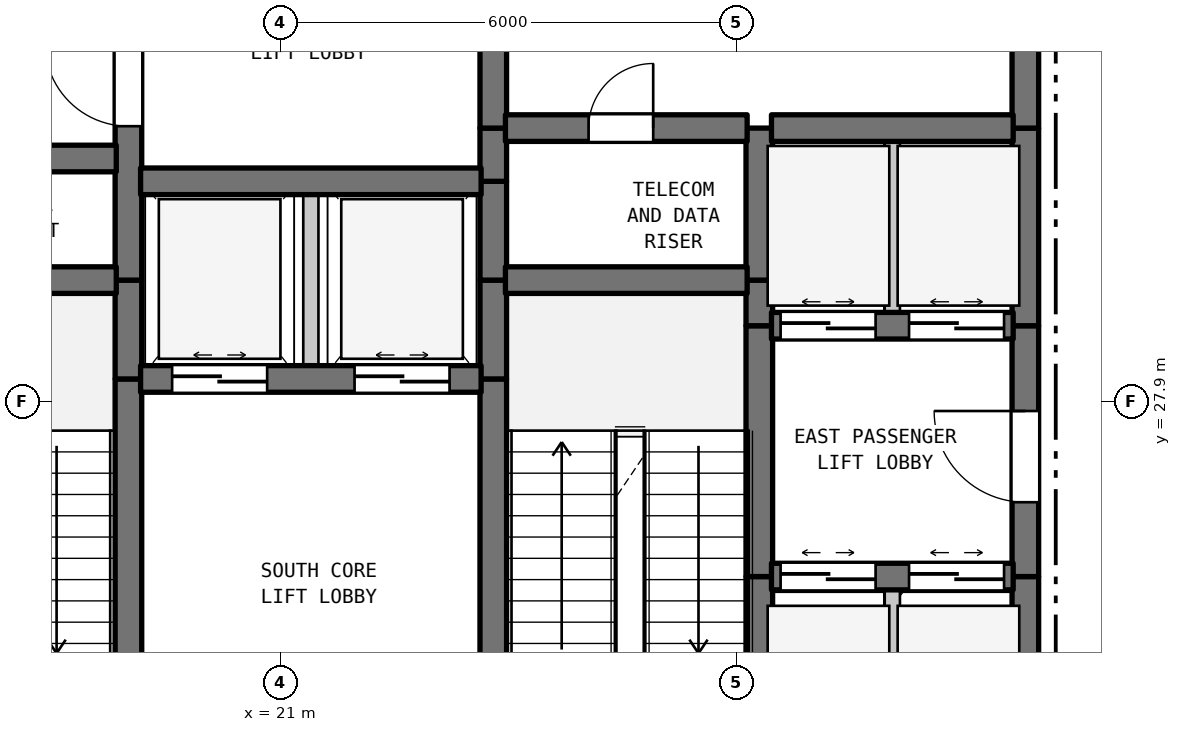
"""IFC4 building model, lengths in metres.
Left out: names, types, materials, properties, quantities, classifications, styles, units other than length and angle.
Written with IfcOpenShell. Run it as: python <this file> out.ifc"""

import sys

from ifc_helpers import new_model, si_unit, direction, frame, frame_2d, origin, place, context, subcontext, project, spatial, rectangle, extrude, element, fill, save


model = new_model("IFC4")
c1 = context("Model", 3, precision=1e-05, world=origin(), true_north=direction((0.0, 1.0)))
c2 = subcontext(c1, "Body", "Model", "MODEL_VIEW")
j1 = project(units=[si_unit("LENGTHUNIT", "METRE"), si_unit("PLANEANGLEUNIT", "RADIAN")], contexts=[c1])
p1 = place(None, origin())
s1 = spatial("IfcSite", under=j1, at=p1, CompositionType="ELEMENT")
p2 = place(p1, origin())
s2 = spatial("IfcBuilding", under=s1, at=p2, CompositionType="ELEMENT")
p3 = place(p2, frame((0.0, 0.0, 125.3)))
s3 = spatial("IfcBuildingStorey", under=s2, at=p3, CompositionType="ELEMENT", Elevation=125.3)
p4 = place(p3, frame((19.0, 22.7, 0.0), z_axis=(0.0, 0.0, 1.0), x_axis=(0.0, 1.0, 0.0)))
e1 = element("IfcWall", 1, at=p4, inside=s3, PredefinedType="SHEAR", context=c2, shape_type="SweptSolid", body=[
    extrude(rectangle(XDim=5.5, YDim=0.35, at=frame_2d((2.75, 0.0))), origin(), (0.0, 0.0, 1.0), 4.185),
])
p5 = place(p4, frame((0.631, 0.0, 0.0)))
e2 = element("IfcOpeningElement", 2, at=p5, cuts=e1, PredefinedType="OPENING", context=c2, shape_type="SweptSolid", body=[
    extrude(rectangle(XDim=1.1, YDim=2.15, at=frame_2d((0.55, 1.075))), frame((0.0, 0.185, 0.0), z_axis=(0.0, -1.0, 0.0), x_axis=(1.0, 0.0, 0.0)), (0.0, 0.0, 1.0), 0.37),
])
p6 = place(p3, frame((19.0, 28.2, 0.0), z_axis=(0.0, 0.0, 1.0), x_axis=(0.0, 1.0, 0.0)))
e3 = element("IfcWall", 3, at=p6, inside=s3, PredefinedType="SHEAR", context=c2, shape_type="SweptSolid", body=[
    extrude(rectangle(XDim=1.3, YDim=0.35, at=frame_2d((0.65, 0.0))), origin(), (0.0, 0.0, 1.0), 4.185),
])
p7 = place(p3, frame((19.0, 29.5, 0.0), z_axis=(0.0, 0.0, 1.0), x_axis=(0.0, 1.0, 0.0)))
e4 = element("IfcWall", 4, at=p7, inside=s3, PredefinedType="SHEAR", context=c2, shape_type="SweptSolid", body=[
    extrude(rectangle(XDim=5.5, YDim=0.35, at=frame_2d((2.75, 0.0))), origin(), (0.0, 0.0, 1.0), 4.185),
])
p8 = place(p7, frame((2.025, 0.0, 0.0)))
e5 = element("IfcOpeningElement", 5, at=p8, cuts=e4, PredefinedType="OPENING", context=c2, shape_type="SweptSolid", body=[
    extrude(rectangle(XDim=1.1, YDim=2.15, at=frame_2d((0.55, 1.075))), frame((0.0, 0.185, 0.0), z_axis=(0.0, -1.0, 0.0), x_axis=(1.0, 0.0, 0.0)), (0.0, 0.0, 1.0), 0.37),
])
p9 = place(p3, frame((21.4, 28.2, 0.0), z_axis=(0.0, 0.0, 1.0), x_axis=(0.0, 1.0, 0.0)))
e6 = element("IfcWall", 6, at=p9, inside=s3, PredefinedType="STANDARD", context=c2, shape_type="SweptSolid", body=[
    extrude(rectangle(XDim=2.6, YDim=0.2, at=frame_2d((1.3, 0.0))), origin(), (0.0, 0.0, 1.0), 4.185),
])
p10 = place(p3, frame((23.8, 22.7, 0.0), z_axis=(0.0, 0.0, 1.0), x_axis=(0.0, 1.0, 0.0)))
e7 = element("IfcWall", 7, at=p10, inside=s3, PredefinedType="SHEAR", context=c2, shape_type="SweptSolid", body=[
    extrude(rectangle(XDim=5.5, YDim=0.35, at=frame_2d((2.75, 0.0))), origin(), (0.0, 0.0, 1.0), 4.185),
])
p11 = place(p10, frame((0.235, 0.0, 0.0)))
e8 = element("IfcOpeningElement", 8, at=p11, cuts=e7, PredefinedType="OPENING", context=c2, shape_type="SweptSolid", body=[
    extrude(rectangle(XDim=1.1, YDim=2.15, at=frame_2d((0.55, 1.075))), frame((0.0, 0.185, 0.0), z_axis=(0.0, -1.0, 0.0), x_axis=(1.0, 0.0, 0.0)), (0.0, 0.0, 1.0), 0.37),
])
for number, where, z_axis, x_axis in (
    (9, (23.8, 28.2, 0.0), (0.0, 0.0, 1.0), (0.0, 1.0, 0.0)),
    (10, (23.8, 29.5, 0.0), (0.0, 0.0, 1.0), (0.0, 1.0, 0.0)),
):
    element("IfcWall", number, at=place(p3, frame(where, z_axis=z_axis, x_axis=x_axis)), inside=s3, PredefinedType="SHEAR", context=c2, shape_type="SweptSolid", body=[
        extrude(rectangle(XDim=1.3, YDim=0.35, at=frame_2d((0.65, 0.0))), origin(), (0.0, 0.0, 1.0), 4.185),
    ])
p12 = place(p3, frame((23.8, 30.8, 0.0), z_axis=(0.0, 0.0, 1.0), x_axis=(0.0, 1.0, 0.0)))
e11 = element("IfcWall", 11, at=p12, inside=s3, PredefinedType="SHEAR", context=c2, shape_type="SweptSolid", body=[
    extrude(rectangle(XDim=0.7, YDim=0.35, at=frame_2d((0.35, 0.0))), origin(), (0.0, 0.0, 1.0), 4.185),
])
p13 = place(p3, frame((23.8, 31.5, 0.0), z_axis=(0.0, 0.0, 1.0), x_axis=(0.0, 1.0, 0.0)))
e12 = element("IfcWall", 12, at=p13, inside=s3, PredefinedType="SHEAR", context=c2, shape_type="SweptSolid", body=[
    extrude(rectangle(XDim=3.5, YDim=0.35, at=frame_2d((1.75, 0.0))), origin(), (0.0, 0.0, 1.0), 4.185),
])
p14 = place(p13, frame((1.127, 0.0, 0.0)))
e13 = element("IfcOpeningElement", 13, at=p14, cuts=e12, PredefinedType="OPENING", context=c2, shape_type="SweptSolid", body=[
    extrude(rectangle(XDim=1.1, YDim=2.15, at=frame_2d((0.55, 1.075))), frame((0.0, 0.185, 0.0), z_axis=(0.0, -1.0, 0.0), x_axis=(1.0, 0.0, 0.0)), (0.0, 0.0, 1.0), 0.37),
])
p15 = place(p3, frame((27.3, 22.7, 0.0), z_axis=(0.0, 0.0, 1.0), x_axis=(0.0, 1.0, 0.0)))
e14 = element("IfcWall", 14, at=p15, inside=s3, PredefinedType="SHEAR", context=c2, shape_type="SweptSolid", body=[
    extrude(rectangle(XDim=2.9, YDim=0.35, at=frame_2d((1.45, 0.0))), origin(), (0.0, 0.0, 1.0), 4.185),
])
p16 = place(p3, frame((27.3, 25.6, 0.0), z_axis=(0.0, 0.0, 1.0), x_axis=(0.0, 1.0, 0.0)))
e15 = element("IfcWall", 15, at=p16, inside=s3, PredefinedType="SHEAR", context=c2, shape_type="SweptSolid", body=[
    extrude(rectangle(XDim=3.3, YDim=0.35, at=frame_2d((1.65, 0.0))), origin(), (0.0, 0.0, 1.0), 4.185),
])
p17 = place(p3, frame((27.3, 28.9, 0.0), z_axis=(0.0, 0.0, 1.0), x_axis=(0.0, 1.0, 0.0)))
e16 = element("IfcWall", 16, at=p17, inside=s3, PredefinedType="SHEAR", context=c2, shape_type="SweptSolid", body=[
    extrude(rectangle(XDim=0.6, YDim=0.35, at=frame_2d((0.3, 0.0))), origin(), (0.0, 0.0, 1.0), 4.185),
])
p18 = place(p3, frame((27.3, 29.5, 0.0), z_axis=(0.0, 0.0, 1.0), x_axis=(0.0, 1.0, 0.0)))
e17 = element("IfcWall", 17, at=p18, inside=s3, PredefinedType="SHEAR", context=c2, shape_type="SweptSolid", body=[
    extrude(rectangle(XDim=2.0, YDim=0.35, at=frame_2d((1.0, 0.0))), origin(), (0.0, 0.0, 1.0), 4.185),
])
p19 = place(p3, frame((29.05, 22.7, 0.0), z_axis=(0.0, 0.0, 1.0), x_axis=(0.0, 1.0, 0.0)))
e18 = element("IfcWall", 18, at=p19, inside=s3, PredefinedType="STANDARD", context=c2, shape_type="SweptSolid", body=[
    extrude(rectangle(XDim=2.9, YDim=0.2, at=frame_2d((1.45, 0.0))), origin(), (0.0, 0.0, 1.0), 4.185),
])
p20 = place(p3, frame((29.05, 28.9, 0.0), z_axis=(0.0, 0.0, 1.0), x_axis=(0.0, 1.0, 0.0)))
e19 = element("IfcWall", 19, at=p20, inside=s3, PredefinedType="STANDARD", context=c2, shape_type="SweptSolid", body=[
    extrude(rectangle(XDim=2.6, YDim=0.2, at=frame_2d((1.3, 0.0))), origin(), (0.0, 0.0, 1.0), 4.185),
])
p21 = place(p3, frame((30.8, 22.7, 0.0), z_axis=(0.0, 0.0, 1.0), x_axis=(0.0, 1.0, 0.0)))
e20 = element("IfcWall", 20, at=p21, inside=s3, PredefinedType="SHEAR", context=c2, shape_type="SweptSolid", body=[
    extrude(rectangle(XDim=2.9, YDim=0.35, at=frame_2d((1.45, 0.0))), origin(), (0.0, 0.0, 1.0), 4.185),
])
p22 = place(p3, frame((30.8, 25.6, 0.0), z_axis=(0.0, 0.0, 1.0), x_axis=(0.0, 1.0, 0.0)))
e21 = element("IfcWall", 21, at=p22, inside=s3, PredefinedType="SHEAR", context=c2, shape_type="SweptSolid", body=[
    extrude(rectangle(XDim=3.3, YDim=0.35, at=frame_2d((1.65, 0.0))), origin(), (0.0, 0.0, 1.0), 4.185),
])
p23 = place(p22, frame((0.978, 0.0, 0.0)))
e22 = element("IfcOpeningElement", 22, at=p23, cuts=e21, PredefinedType="OPENING", context=c2, shape_type="SweptSolid", body=[
    extrude(rectangle(XDim=1.2, YDim=2.2, at=frame_2d((0.6, 1.1))), frame((0.0, 0.185, 0.0), z_axis=(0.0, -1.0, 0.0), x_axis=(1.0, 0.0, 0.0)), (0.0, 0.0, 1.0), 0.37),
])
p24 = place(p3, frame((30.8, 28.9, 0.0), z_axis=(0.0, 0.0, 1.0), x_axis=(0.0, 1.0, 0.0)))
e23 = element("IfcWall", 23, at=p24, inside=s3, PredefinedType="SHEAR", context=c2, shape_type="SweptSolid", body=[
    extrude(rectangle(XDim=2.6, YDim=0.35, at=frame_2d((1.3, 0.0))), origin(), (0.0, 0.0, 1.0), 4.185),
])
p25 = place(p3, frame((30.8, 31.5, 0.0), z_axis=(0.0, 0.0, 1.0), x_axis=(0.0, 1.0, 0.0)))
e24 = element("IfcWall", 24, at=p25, inside=s3, PredefinedType="SHEAR", context=c2, shape_type="SweptSolid", body=[
    extrude(rectangle(XDim=3.5, YDim=0.35, at=frame_2d((1.75, 0.0))), origin(), (0.0, 0.0, 1.0), 4.185),
])
p26 = place(p25, frame((1.15, 0.0, 0.0)))
e25 = element("IfcOpeningElement", 25, at=p26, cuts=e24, PredefinedType="OPENING", context=c2, shape_type="SweptSolid", body=[
    extrude(rectangle(XDim=1.2, YDim=2.2, at=frame_2d((0.6, 1.1))), frame((0.0, 0.185, 0.0), z_axis=(0.0, -1.0, 0.0), x_axis=(1.0, 0.0, 0.0)), (0.0, 0.0, 1.0), 0.37),
])
p27 = place(p3, frame((27.46, 25.6, 0.0), z_axis=(0.0, 0.0, 1.0), x_axis=(1.0, 0.0, 0.0)))
e26 = element("IfcWall", 26, at=p27, inside=s3, PredefinedType="SHEAR", context=c2, shape_type="SweptSolid", body=[
    extrude(rectangle(XDim=3.18, YDim=0.35, at=frame_2d((1.59, 0.0))), origin(), (0.0, 0.0, 1.0), 4.185),
])
p28 = place(p27, frame((0.12, 0.0, 0.0)))
e27 = element("IfcOpeningElement", 27, at=p28, cuts=e26, PredefinedType="OPENING", context=c2, shape_type="SweptSolid", body=[
    extrude(rectangle(XDim=1.25, YDim=2.2, at=frame_2d((0.625, 1.1))), frame((0.0, 0.185, 0.0), z_axis=(0.0, -1.0, 0.0), x_axis=(1.0, 0.0, 0.0)), (0.0, 0.0, 1.0), 0.37),
])
p29 = place(p27, frame((1.81, 0.0, 0.0)))
e28 = element("IfcOpeningElement", 28, at=p29, cuts=e26, PredefinedType="OPENING", context=c2, shape_type="SweptSolid", body=[
    extrude(rectangle(XDim=1.25, YDim=2.2, at=frame_2d((0.625, 1.1))), frame((0.0, 0.185, 0.0), z_axis=(0.0, -1.0, 0.0), x_axis=(1.0, 0.0, 0.0)), (0.0, 0.0, 1.0), 0.37),
])
p30 = place(p3, frame((19.16, 28.2, 0.0), z_axis=(0.0, 0.0, 1.0), x_axis=(1.0, 0.0, 0.0)))
e29 = element("IfcWall", 29, at=p30, inside=s3, PredefinedType="SHEAR", context=c2, shape_type="SweptSolid", body=[
    extrude(rectangle(XDim=4.48, YDim=0.35, at=frame_2d((2.24, 0.0))), origin(), (0.0, 0.0, 1.0), 4.185),
])
p31 = place(p30, frame((0.415, 0.0, 0.0)))
e30 = element("IfcOpeningElement", 30, at=p31, cuts=e29, PredefinedType="OPENING", context=c2, shape_type="SweptSolid", body=[
    extrude(rectangle(XDim=1.25, YDim=2.2, at=frame_2d((0.625, 1.1))), frame((0.0, 0.185, 0.0), z_axis=(0.0, -1.0, 0.0), x_axis=(1.0, 0.0, 0.0)), (0.0, 0.0, 1.0), 0.37),
])
p32 = place(p30, frame((2.815, 0.0, 0.0)))
e31 = element("IfcOpeningElement", 31, at=p32, cuts=e29, PredefinedType="OPENING", context=c2, shape_type="SweptSolid", body=[
    extrude(rectangle(XDim=1.25, YDim=2.2, at=frame_2d((0.625, 1.1))), frame((0.0, 0.185, 0.0), z_axis=(0.0, -1.0, 0.0), x_axis=(1.0, 0.0, 0.0)), (0.0, 0.0, 1.0), 0.37),
])
p33 = place(p3, frame((27.46, 28.9, 0.0), z_axis=(0.0, 0.0, 1.0), x_axis=(1.0, 0.0, 0.0)))
e32 = element("IfcWall", 32, at=p33, inside=s3, PredefinedType="SHEAR", context=c2, shape_type="SweptSolid", body=[
    extrude(rectangle(XDim=3.18, YDim=0.35, at=frame_2d((1.59, 0.0))), origin(), (0.0, 0.0, 1.0), 4.185),
])
p34 = place(p33, frame((0.12, 0.0, 0.0)))
e33 = element("IfcOpeningElement", 33, at=p34, cuts=e32, PredefinedType="OPENING", context=c2, shape_type="SweptSolid", body=[
    extrude(rectangle(XDim=1.25, YDim=2.2, at=frame_2d((0.625, 1.1))), frame((0.0, 0.185, 0.0), z_axis=(0.0, -1.0, 0.0), x_axis=(1.0, 0.0, 0.0)), (0.0, 0.0, 1.0), 0.37),
])
p35 = place(p33, frame((1.81, 0.0, 0.0)))
e34 = element("IfcOpeningElement", 34, at=p35, cuts=e32, PredefinedType="OPENING", context=c2, shape_type="SweptSolid", body=[
    extrude(rectangle(XDim=1.25, YDim=2.2, at=frame_2d((0.625, 1.1))), frame((0.0, 0.185, 0.0), z_axis=(0.0, -1.0, 0.0), x_axis=(1.0, 0.0, 0.0)), (0.0, 0.0, 1.0), 0.37),
])
p36 = place(p3, frame((15.16, 29.5, 0.0), z_axis=(0.0, 0.0, 1.0), x_axis=(1.0, 0.0, 0.0)))
e35 = element("IfcWall", 35, at=p36, inside=s3, PredefinedType="SHEAR", context=c2, shape_type="SweptSolid", body=[
    extrude(rectangle(XDim=3.68, YDim=0.35, at=frame_2d((1.84, 0.0))), origin(), (0.0, 0.0, 1.0), 4.185),
])
p37 = place(p3, frame((23.96, 29.5, 0.0), z_axis=(0.0, 0.0, 1.0), x_axis=(1.0, 0.0, 0.0)))
e36 = element("IfcWall", 36, at=p37, inside=s3, PredefinedType="SHEAR", context=c2, shape_type="SweptSolid", body=[
    extrude(rectangle(XDim=3.18, YDim=0.35, at=frame_2d((1.59, 0.0))), origin(), (0.0, 0.0, 1.0), 4.185),
])
p38 = place(p3, frame((19.16, 30.8, 0.0), z_axis=(0.0, 0.0, 1.0), x_axis=(1.0, 0.0, 0.0)))
e37 = element("IfcWall", 37, at=p38, inside=s3, PredefinedType="SHEAR", context=c2, shape_type="SweptSolid", body=[
    extrude(rectangle(XDim=4.48, YDim=0.35, at=frame_2d((2.24, 0.0))), origin(), (0.0, 0.0, 1.0), 4.185),
])
p39 = place(p3, frame((15.16, 31.1, 0.0), z_axis=(0.0, 0.0, 1.0), x_axis=(1.0, 0.0, 0.0)))
e38 = element("IfcWall", 38, at=p39, inside=s3, PredefinedType="SHEAR", context=c2, shape_type="SweptSolid", body=[
    extrude(rectangle(XDim=3.68, YDim=0.35, at=frame_2d((1.84, 0.0))), origin(), (0.0, 0.0, 1.0), 4.185),
])
p40 = place(p3, frame((23.96, 31.5, 0.0), z_axis=(0.0, 0.0, 1.0), x_axis=(1.0, 0.0, 0.0)))
e39 = element("IfcWall", 39, at=p40, inside=s3, PredefinedType="SHEAR", context=c2, shape_type="SweptSolid", body=[
    extrude(rectangle(XDim=3.18, YDim=0.35, at=frame_2d((1.59, 0.0))), origin(), (0.0, 0.0, 1.0), 4.185),
])
p41 = place(p40, frame((1.094, 0.0, 0.0)))
e40 = element("IfcOpeningElement", 40, at=p41, cuts=e39, PredefinedType="OPENING", context=c2, shape_type="SweptSolid", body=[
    extrude(rectangle(XDim=0.85, YDim=2.1, at=frame_2d((0.425, 1.05))), frame((0.0, 0.185, 0.0), z_axis=(0.0, -1.0, 0.0), x_axis=(1.0, 0.0, 0.0)), (0.0, 0.0, 1.0), 0.37),
])
p42 = place(p3, frame((27.46, 31.5, 0.0), z_axis=(0.0, 0.0, 1.0), x_axis=(1.0, 0.0, 0.0)))
e41 = element("IfcWall", 41, at=p42, inside=s3, PredefinedType="SHEAR", context=c2, shape_type="SweptSolid", body=[
    extrude(rectangle(XDim=3.18, YDim=0.35, at=frame_2d((1.59, 0.0))), origin(), (0.0, 0.0, 1.0), 4.185),
])
p43 = place(p8, origin())
e42 = element("IfcDoor", 42, at=p43, inside=s3, OperationType="SINGLE_SWING_RIGHT", PredefinedType="DOOR", context=c2, shape_type="SweptSolid", body=[
    extrude(rectangle(XDim=1.1, YDim=2.15, at=frame_2d((0.55, 1.075))), frame((0.0, 0.025, 0.0), z_axis=(0.0, -1.0, 0.0), x_axis=(1.0, 0.0, 0.0)), (0.0, 0.0, 1.0), 0.05),
])
fill(e5, e42)
p44 = place(p23, origin())
e43 = element("IfcDoor", 43, at=p44, inside=s3, OperationType="SINGLE_SWING_RIGHT", PredefinedType="DOOR", context=c2, shape_type="SweptSolid", body=[
    extrude(rectangle(XDim=1.2, YDim=2.2, at=frame_2d((0.6, 1.1))), frame((0.0, 0.025, 0.0), z_axis=(0.0, -1.0, 0.0), x_axis=(1.0, 0.0, 0.0)), (0.0, 0.0, 1.0), 0.05),
])
fill(e22, e43)
p45 = place(p28, origin())
e44 = element("IfcDoor", 44, at=p45, inside=s3, OperationType="DOUBLE_DOOR_SLIDING", PredefinedType="DOOR", context=c2, shape_type="SweptSolid", body=[
    extrude(rectangle(XDim=1.25, YDim=2.2, at=frame_2d((0.625, 1.1))), frame((0.0, 0.025, 0.0), z_axis=(0.0, -1.0, 0.0), x_axis=(1.0, 0.0, 0.0)), (0.0, 0.0, 1.0), 0.05),
])
fill(e27, e44)
p46 = place(p29, origin())
e45 = element("IfcDoor", 45, at=p46, inside=s3, OperationType="DOUBLE_DOOR_SLIDING", PredefinedType="DOOR", context=c2, shape_type="SweptSolid", body=[
    extrude(rectangle(XDim=1.25, YDim=2.2, at=frame_2d((0.625, 1.1))), frame((0.0, 0.025, 0.0), z_axis=(0.0, -1.0, 0.0), x_axis=(1.0, 0.0, 0.0)), (0.0, 0.0, 1.0), 0.05),
])
fill(e28, e45)
p47 = place(p31, origin())
e46 = element("IfcDoor", 46, at=p47, inside=s3, OperationType="DOUBLE_DOOR_SLIDING", PredefinedType="DOOR", context=c2, shape_type="SweptSolid", body=[
    extrude(rectangle(XDim=1.25, YDim=2.2, at=frame_2d((0.625, 1.1))), frame((0.0, 0.025, 0.0), z_axis=(0.0, -1.0, 0.0), x_axis=(1.0, 0.0, 0.0)), (0.0, 0.0, 1.0), 0.05),
])
fill(e30, e46)
p48 = place(p32, origin())
e47 = element("IfcDoor", 47, at=p48, inside=s3, OperationType="DOUBLE_DOOR_SLIDING", PredefinedType="DOOR", context=c2, shape_type="SweptSolid", body=[
    extrude(rectangle(XDim=1.25, YDim=2.2, at=frame_2d((0.625, 1.1))), frame((0.0, 0.025, 0.0), z_axis=(0.0, -1.0, 0.0), x_axis=(1.0, 0.0, 0.0)), (0.0, 0.0, 1.0), 0.05),
])
fill(e31, e47)
p49 = place(p34, origin())
e48 = element("IfcDoor", 48, at=p49, inside=s3, OperationType="DOUBLE_DOOR_SLIDING", PredefinedType="DOOR", context=c2, shape_type="SweptSolid", body=[
    extrude(rectangle(XDim=1.25, YDim=2.2, at=frame_2d((0.625, 1.1))), frame((0.0, 0.025, 0.0), z_axis=(0.0, -1.0, 0.0), x_axis=(1.0, 0.0, 0.0)), (0.0, 0.0, 1.0), 0.05),
])
fill(e33, e48)
p50 = place(p35, origin())
e49 = element("IfcDoor", 49, at=p50, inside=s3, OperationType="DOUBLE_DOOR_SLIDING", PredefinedType="DOOR", context=c2, shape_type="SweptSolid", body=[
    extrude(rectangle(XDim=1.25, YDim=2.2, at=frame_2d((0.625, 1.1))), frame((0.0, 0.025, 0.0), z_axis=(0.0, -1.0, 0.0), x_axis=(1.0, 0.0, 0.0)), (0.0, 0.0, 1.0), 0.05),
])
fill(e34, e49)
p51 = place(p41, origin())
e50 = element("IfcDoor", 50, at=p51, inside=s3, OperationType="SINGLE_SWING_RIGHT", PredefinedType="DOOR", context=c2, shape_type="SweptSolid", body=[
    extrude(rectangle(XDim=0.85, YDim=2.1, at=frame_2d((0.425, 1.05))), frame((0.0, 0.025, 0.0), z_axis=(0.0, -1.0, 0.0), x_axis=(1.0, 0.0, 0.0)), (0.0, 0.0, 1.0), 0.05),
])
fill(e40, e50)
save(model, sys.argv[1])
